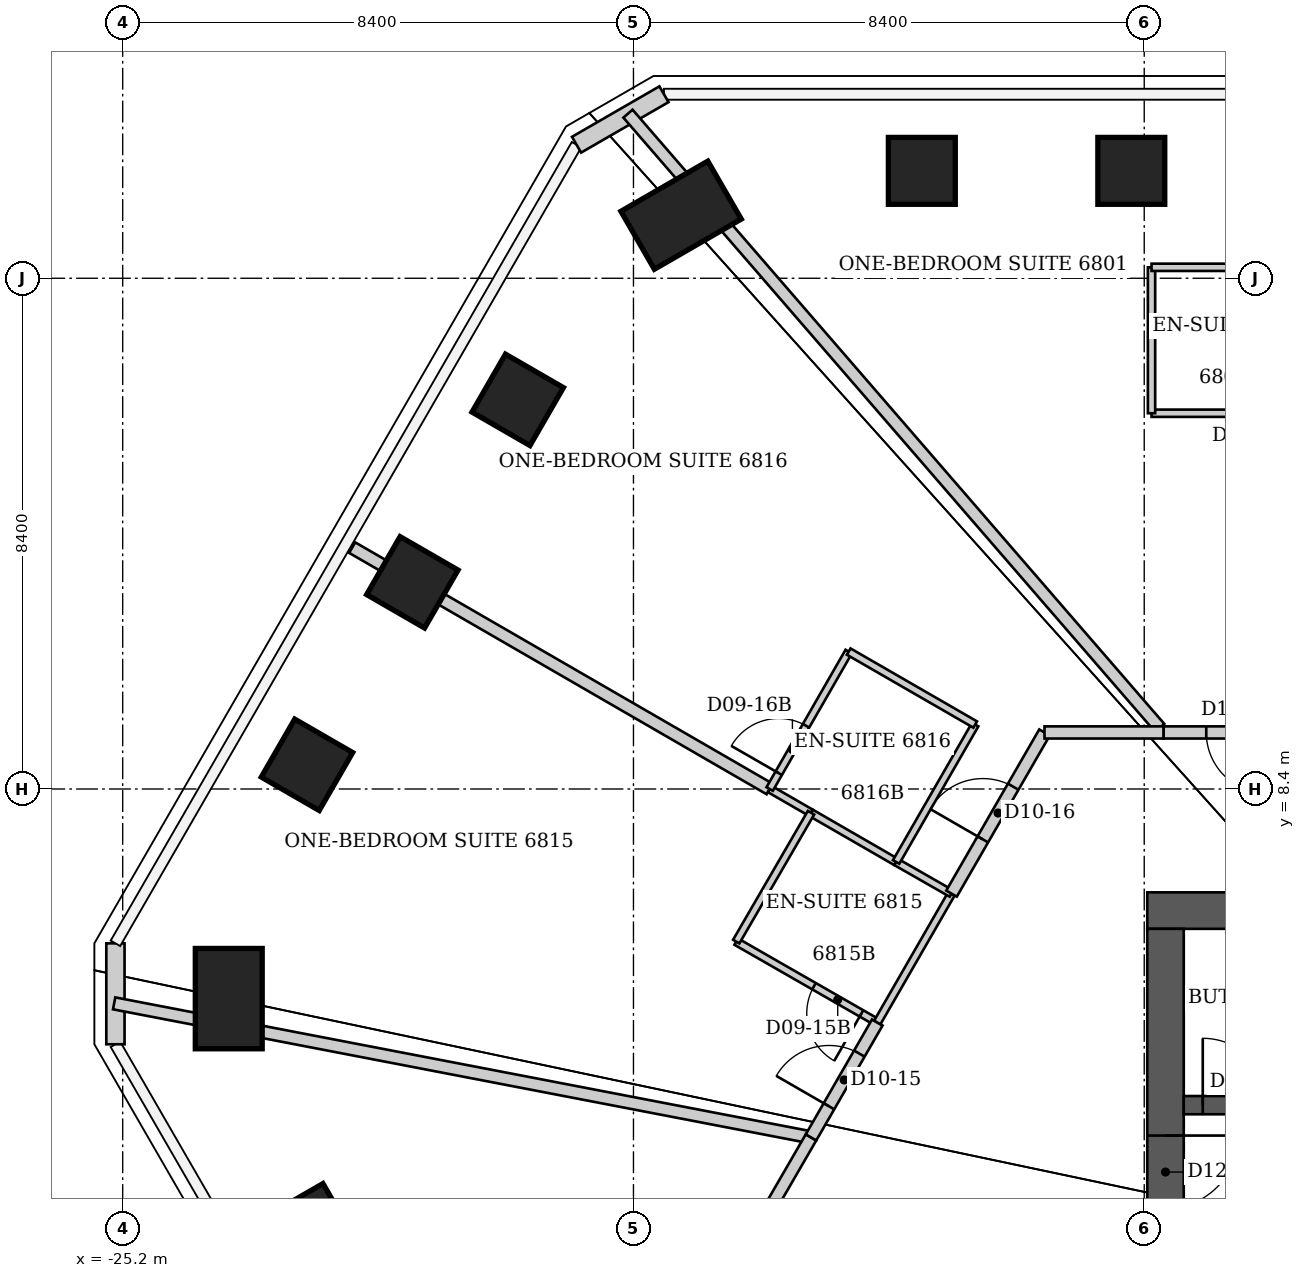
"""IFC4 building model, lengths in metres.
Left out: names, types, materials, properties, quantities, classifications, styles, units other than length and angle.
Written with IfcOpenShell. Run it as: python <this file> out.ifc"""

import sys

from ifc_helpers import new_model, si_unit, direction, frame, frame_2d, origin, origin_2d, place, context, subcontext, project, spatial, rectangle, extrude, element, fill, save


model = new_model("IFC4")
c1 = context("Model", 3, precision=1e-05, world=origin(), true_north=direction((0.0, 1.0)))
c2 = subcontext(c1, "Body", "Model", "MODEL_VIEW")
j1 = project(units=[si_unit("LENGTHUNIT", "METRE"), si_unit("PLANEANGLEUNIT", "RADIAN")], contexts=[c1])
p1 = place(None, origin())
s1 = spatial("IfcSite", under=j1, at=p1, CompositionType="ELEMENT")
p2 = place(p1, origin())
s2 = spatial("IfcBuilding", under=s1, at=p2, CompositionType="ELEMENT")
p3 = place(p2, frame((0.0, 0.0, 272.2)))
s3 = spatial("IfcBuildingStorey", under=s2, at=p3, CompositionType="ELEMENT", Elevation=272.2)
for number, where, z_axis, x_axis in (
    (1, (-12.058, 18.566, 0.0), (0.0, 0.0, 1.0), (0.0, 1.0, 0.0)),
    (2, (-8.613, 18.566, 0.0), (0.0, 0.0, 1.0), (0.0, 1.0, 0.0)),
    (3, (-22.108, 1.159, 0.0), (0.0, 0.0, 1.0), (-0.866, -0.5, 0.0)),
):
    element("IfcColumn", number, at=place(p3, frame(where, z_axis=z_axis, x_axis=x_axis)), inside=s3, PredefinedType="COLUMN", context=c2, shape_type="SweptSolid", body=[
        extrude(rectangle(XDim=1.1, YDim=1.1, at=origin_2d()), origin(), (0.0, 0.0, 1.0), 3.8),
    ])
p4 = place(p3, frame((-23.456, 4.952, 0.0), z_axis=(0.0, 0.0, 1.0), x_axis=(-1.0, 0.0, 0.0)))
e4 = element("IfcColumn", 4, at=p4, inside=s3, PredefinedType="COLUMN", context=c2, shape_type="SweptSolid", body=[
    extrude(rectangle(XDim=1.1, YDim=1.65, at=origin_2d()), origin(), (0.0, 0.0, 1.0), 3.8),
])
for number, where, z_axis, x_axis in (
    (5, (-22.169, 8.798, 0.0), (0.0, 0.0, 1.0), (-0.866, 0.5, 0.0)),
    (6, (-20.437, 11.799, 0.0), (0.0, 0.0, 1.0), (-0.866, 0.5, 0.0)),
    (7, (-18.704, 14.8, 0.0), (0.0, 0.0, 1.0), (-0.866, 0.5, 0.0)),
):
    element("IfcColumn", number, at=place(p3, frame(where, z_axis=z_axis, x_axis=x_axis)), inside=s3, PredefinedType="COLUMN", context=c2, shape_type="SweptSolid", body=[
        extrude(rectangle(XDim=1.1, YDim=1.1, at=origin_2d()), origin(), (0.0, 0.0, 1.0), 3.8),
    ])
p5 = place(p3, frame((-16.017, 17.837, 0.0), z_axis=(0.0, 0.0, 1.0), x_axis=(-0.5, 0.866025403784, 0.0)))
e8 = element("IfcColumn", 8, at=p5, inside=s3, PredefinedType="COLUMN", context=c2, shape_type="SweptSolid", body=[
    extrude(rectangle(XDim=1.1, YDim=1.65, at=origin_2d()), origin(), (0.0, 0.0, 1.0), 3.8),
])
p6 = place(p3, frame((-8.35, 6.4, 0.0), z_axis=(0.0, 0.0, 1.0), x_axis=(1.0, 0.0, 0.0)))
e9 = element("IfcWall", 9, at=p6, inside=s3, PredefinedType="SHEAR", context=c2, shape_type="SweptSolid", body=[
    extrude(rectangle(XDim=16.7, YDim=0.6, at=frame_2d((8.35, 0.0))), origin(), (0.0, 0.0, 1.0), 3.8),
])
p7 = place(p6, frame((6.488, 0.0, 0.0)))
e10 = element("IfcOpeningElement", 10, at=p7, cuts=e9, PredefinedType="OPENING", context=c2, shape_type="SweptSolid", body=[
    extrude(rectangle(XDim=1.1, YDim=2.1, at=frame_2d((0.55, 1.05))), frame((0.0, 0.3, 0.0), z_axis=(0.0, -1.0, 0.0), x_axis=(1.0, 0.0, 0.0)), (0.0, 0.0, 1.0), 0.6),
])
p8 = place(p6, frame((9.113, 0.0, 0.0)))
e11 = element("IfcOpeningElement", 11, at=p8, cuts=e9, PredefinedType="OPENING", context=c2, shape_type="SweptSolid", body=[
    extrude(rectangle(XDim=1.1, YDim=2.1, at=frame_2d((0.55, 1.05))), frame((0.0, 0.3, 0.0), z_axis=(0.0, -1.0, 0.0), x_axis=(1.0, 0.0, 0.0)), (0.0, 0.0, 1.0), 0.6),
])
p9 = place(p6, frame((11.738, 0.0, 0.0)))
e12 = element("IfcOpeningElement", 12, at=p9, cuts=e9, PredefinedType="OPENING", context=c2, shape_type="SweptSolid", body=[
    extrude(rectangle(XDim=1.1, YDim=2.1, at=frame_2d((0.55, 1.05))), frame((0.0, 0.3, 0.0), z_axis=(0.0, -1.0, 0.0), x_axis=(1.0, 0.0, 0.0)), (0.0, 0.0, 1.0), 0.6),
])
p10 = place(p6, frame((14.363, 0.0, 0.0)))
e13 = element("IfcOpeningElement", 13, at=p10, cuts=e9, PredefinedType="OPENING", context=c2, shape_type="SweptSolid", body=[
    extrude(rectangle(XDim=1.1, YDim=2.1, at=frame_2d((0.55, 1.05))), frame((0.0, 0.3, 0.0), z_axis=(0.0, -1.0, 0.0), x_axis=(1.0, 0.0, 0.0)), (0.0, 0.0, 1.0), 0.6),
])
p11 = place(p3, frame((-8.05, -6.1, 0.0), z_axis=(0.0, 0.0, 1.0), x_axis=(0.0, 1.0, 0.0)))
e14 = element("IfcWall", 14, at=p11, inside=s3, PredefinedType="SHEAR", context=c2, shape_type="SweptSolid", body=[
    extrude(rectangle(XDim=12.2, YDim=0.6, at=frame_2d((6.1, 0.0))), origin(), (0.0, 0.0, 1.0), 3.8),
])
p12 = place(p11, frame((7.6, 0.0, 0.0)))
e15 = element("IfcOpeningElement", 15, at=p12, cuts=e14, PredefinedType="OPENING", context=c2, shape_type="SweptSolid", body=[
    extrude(rectangle(XDim=1.2, YDim=2.2, at=frame_2d((0.6, 1.1))), frame((0.0, 0.3, 0.0), z_axis=(0.0, -1.0, 0.0), x_axis=(1.0, 0.0, 0.0)), (0.0, 0.0, 1.0), 0.6),
])
p13 = place(p3, frame((-7.75, 3.2, 0.0), z_axis=(0.0, 0.0, 1.0), x_axis=(1.0, 0.0, 0.0)))
e16 = element("IfcWall", 16, at=p13, inside=s3, PredefinedType="SHEAR", context=c2, shape_type="SweptSolid", body=[
    extrude(rectangle(XDim=15.5, YDim=0.3, at=frame_2d((7.75, 0.0))), origin(), (0.0, 0.0, 1.0), 3.8),
])
p14 = place(p13, frame((0.312, 0.0, 0.0)))
e17 = element("IfcOpeningElement", 17, at=p14, cuts=e16, PredefinedType="OPENING", context=c2, shape_type="SweptSolid", body=[
    extrude(rectangle(XDim=1.1, YDim=2.2, at=frame_2d((0.55, 1.1))), frame((0.0, 0.15, 0.0), z_axis=(0.0, -1.0, 0.0), x_axis=(1.0, 0.0, 0.0)), (0.0, 0.0, 1.0), 0.3),
])
p15 = place(p13, frame((2.887, 0.0, 0.0)))
e18 = element("IfcOpeningElement", 18, at=p15, cuts=e16, PredefinedType="OPENING", context=c2, shape_type="SweptSolid", body=[
    extrude(rectangle(XDim=1.1, YDim=2.2, at=frame_2d((0.55, 1.1))), frame((0.0, 0.15, 0.0), z_axis=(0.0, -1.0, 0.0), x_axis=(1.0, 0.0, 0.0)), (0.0, 0.0, 1.0), 0.3),
])
p16 = place(p3, frame((-25.319, 4.202, 0.0), z_axis=(0.0, 0.0, 1.0), x_axis=(0.0, 1.0, 0.0)))
e19 = element("IfcWall", 19, at=p16, inside=s3, PredefinedType="SOLIDWALL", context=c2, shape_type="SweptSolid", body=[
    extrude(rectangle(XDim=1.66, YDim=0.3, at=frame_2d((0.83, 0.0))), origin(), (0.0, 0.0, 1.0), 3.64),
])
p17 = place(p3, frame((-17.736, 18.996, 0.0), z_axis=(0.0, 0.0, 1.0), x_axis=(0.866026405774, 0.499998264499, 0.0)))
e20 = element("IfcWall", 20, at=p17, inside=s3, PredefinedType="SOLIDWALL", context=c2, shape_type="SweptSolid", body=[
    extrude(rectangle(XDim=1.66, YDim=0.3, at=frame_2d((0.83, 0.0))), origin(), (0.0, 0.0, 1.0), 3.64),
])
p18 = place(p3, frame((-25.341, 4.874, 0.0), z_axis=(0.0, 0.0, 1.0), x_axis=(0.98200120174, -0.188874666859, 0.0)))
e21 = element("IfcWall", 21, at=p18, inside=s3, PredefinedType="PARTITIONING", context=c2, shape_type="SweptSolid", body=[
    extrude(rectangle(XDim=11.621, YDim=0.2, at=frame_2d((5.81, 0.0))), origin(), (0.0, 0.0, 1.0), 3.64),
])
p19 = place(p3, frame((-21.426, 12.37, 0.0), z_axis=(0.0, 0.0, 1.0), x_axis=(0.865702942609, -0.500558103679, 0.0)))
e22 = element("IfcWall", 22, at=p19, inside=s3, PredefinedType="PARTITIONING", context=c2, shape_type="SweptSolid", body=[
    extrude(rectangle(XDim=7.931, YDim=0.2, at=frame_2d((3.966, 0.0))), origin(), (0.0, 0.0, 1.0), 2.878),
])
p20 = place(p3, frame((-15.11, 5.89, 0.0), z_axis=(0.0, 0.0, 1.0), x_axis=(0.867585049529, -0.497288831399, 0.0)))
e23 = element("IfcWall", 23, at=p20, inside=s3, PredefinedType="PARTITIONING", context=c2, shape_type="SweptSolid", body=[
    extrude(rectangle(XDim=2.674, YDim=0.12, at=frame_2d((1.337, 0.0))), origin(), (0.0, 0.0, 1.0), 3.64),
])
p21 = place(p20, frame((1.474, 0.0, 0.0)))
e24 = element("IfcOpeningElement", 24, at=p21, cuts=e23, PredefinedType="OPENING", context=c2, shape_type="SweptSolid", body=[
    extrude(rectangle(XDim=0.9, YDim=2.03, at=frame_2d((0.45, 1.015))), frame((0.0, 0.06, 0.0), z_axis=(0.0, -1.0, 0.0), x_axis=(1.0, 0.0, 0.0)), (0.0, 0.0, 1.0), 0.12),
])
p22 = place(p3, frame((-14.56, 8.4, 0.0), z_axis=(0.0, 0.0, 1.0), x_axis=(0.866242622795, -0.499623576758, 0.0)))
e25 = element("IfcWall", 25, at=p22, inside=s3, PredefinedType="PARTITIONING", context=c2, shape_type="SweptSolid", body=[
    extrude(rectangle(XDim=0.784, YDim=0.12, at=frame_2d((0.392, 0.0))), origin(), (0.0, 0.0, 1.0), 2.878),
])
p23 = place(p3, frame((-14.54, 1.53, 0.0), z_axis=(0.0, 0.0, 1.0), x_axis=(0.501160466528, 0.865354370642, 0.0)))
e26 = element("IfcWall", 26, at=p23, inside=s3, PredefinedType="PARTITIONING", context=c2, shape_type="SweptSolid", body=[
    extrude(rectangle(XDim=1.317, YDim=0.2, at=frame_2d((0.659, 0.0))), origin(), (0.0, 0.0, 1.0), 3.64),
])
p24 = place(p3, frame((-13.881, 8.008, 0.0), z_axis=(0.0, 0.0, 1.0), x_axis=(0.866183073342, -0.499726808823, 0.0)))
e27 = element("IfcWall", 27, at=p24, inside=s3, PredefinedType="PARTITIONING", context=c2, shape_type="SweptSolid", body=[
    extrude(rectangle(XDim=1.618, YDim=0.12, at=frame_2d((0.809, 0.0))), origin(), (0.0, 0.0, 1.0), 2.878),
])
p25 = place(p3, frame((-13.88, 2.67, 0.0), z_axis=(0.0, 0.0, 1.0), x_axis=(0.499509324401, 0.866308510195, 0.0)))
e28 = element("IfcWall", 28, at=p25, inside=s3, PredefinedType="PARTITIONING", context=c2, shape_type="SweptSolid", body=[
    extrude(rectangle(XDim=2.182, YDim=0.2, at=frame_2d((1.091, 0.0))), origin(), (0.0, 0.0, 1.0), 3.64),
])
p26 = place(p25, frame((0.591, 0.0, 0.0)))
e29 = element("IfcOpeningElement", 29, at=p26, cuts=e28, PredefinedType="OPENING", context=c2, shape_type="SweptSolid", body=[
    extrude(rectangle(XDim=1.0, YDim=2.13, at=frame_2d((0.5, 1.065))), frame((0.0, 0.1, 0.0), z_axis=(0.0, -1.0, 0.0), x_axis=(1.0, 0.0, 0.0)), (0.0, 0.0, 1.0), 0.2),
])
p27 = place(p3, frame((-13.88, 8.01, 0.0), z_axis=(0.0, 0.0, 1.0), x_axis=(-0.501888006485, -0.864932615264, 0.0)))
e30 = element("IfcWall", 30, at=p27, inside=s3, PredefinedType="PARTITIONING", context=c2, shape_type="SweptSolid", body=[
    extrude(rectangle(XDim=2.451, YDim=0.12, at=frame_2d((1.226, 0.0))), origin(), (0.0, 0.0, 1.0), 3.64),
])
p28 = place(p3, frame((-13.26, 10.66, 0.0), z_axis=(0.0, 0.0, 1.0), x_axis=(-0.498627694264, -0.866816256489, 0.0)))
e31 = element("IfcWall", 31, at=p28, inside=s3, PredefinedType="PARTITIONING", context=c2, shape_type="SweptSolid", body=[
    extrude(rectangle(XDim=2.607, YDim=0.12, at=frame_2d((1.304, 0.0))), origin(), (0.0, 0.0, 1.0), 3.64),
])
p29 = place(p28, frame((1.407, 0.0, 0.0)))
e32 = element("IfcOpeningElement", 32, at=p29, cuts=e31, PredefinedType="OPENING", context=c2, shape_type="SweptSolid", body=[
    extrude(rectangle(XDim=0.9, YDim=2.03, at=frame_2d((0.45, 1.015))), frame((0.0, 0.06, 0.0), z_axis=(0.0, -1.0, 0.0), x_axis=(1.0, 0.0, 0.0)), (0.0, 0.0, 1.0), 0.12),
])
p30 = place(p3, frame((-12.79, 4.56, 0.0), z_axis=(0.0, 0.0, 1.0), x_axis=(0.499252904436, 0.866456310158, 0.0)))
e33 = element("IfcWall", 33, at=p30, inside=s3, PredefinedType="PARTITIONING", context=c2, shape_type="SweptSolid", body=[
    extrude(rectangle(XDim=2.446, YDim=0.12, at=frame_2d((1.223, 0.0))), origin(), (0.0, 0.0, 1.0), 3.64),
])
p31 = place(p3, frame((-12.48, 7.2, 0.0), z_axis=(0.0, 0.0, 1.0), x_axis=(0.868214469581, -0.496189111942, 0.0)))
e34 = element("IfcWall", 34, at=p31, inside=s3, PredefinedType="PARTITIONING", context=c2, shape_type="SweptSolid", body=[
    extrude(rectangle(XDim=1.048, YDim=0.12, at=frame_2d((0.524, 0.0))), origin(), (0.0, 0.0, 1.0), 2.878),
])
p32 = place(p3, frame((-12.48, 7.2, 0.0), z_axis=(0.0, 0.0, 1.0), x_axis=(0.498627694264, 0.866816256489, 0.0)))
e35 = element("IfcWall", 35, at=p32, inside=s3, PredefinedType="PARTITIONING", context=c2, shape_type="SweptSolid", body=[
    extrude(rectangle(XDim=2.607, YDim=0.12, at=frame_2d((1.304, 0.0))), origin(), (0.0, 0.0, 1.0), 3.64),
])
p33 = place(p3, frame((-11.569, 6.679, 0.0), z_axis=(0.0, 0.0, 1.0), x_axis=(0.499623447589, 0.866242697297, 0.0)))
e36 = element("IfcWall", 36, at=p33, inside=s3, PredefinedType="PARTITIONING", context=c2, shape_type="SweptSolid", body=[
    extrude(rectangle(XDim=3.06, YDim=0.2, at=frame_2d((1.53, 0.0))), origin(), (0.0, 0.0, 1.0), 3.64),
])
p34 = place(p33, frame((1.03, 0.0, 0.0)))
e37 = element("IfcOpeningElement", 37, at=p34, cuts=e36, PredefinedType="OPENING", context=c2, shape_type="SweptSolid", body=[
    extrude(rectangle(XDim=1.0, YDim=2.13, at=frame_2d((0.5, 1.065))), frame((0.0, 0.1, 0.0), z_axis=(0.0, -1.0, 0.0), x_axis=(1.0, 0.0, 0.0)), (0.0, 0.0, 1.0), 0.2),
])
p35 = place(p3, frame((-11.18, 9.46, 0.0), z_axis=(0.0, 0.0, 1.0), x_axis=(-0.866202511239, 0.499693115345, 0.0)))
e38 = element("IfcWall", 38, at=p35, inside=s3, PredefinedType="PARTITIONING", context=c2, shape_type="SweptSolid", body=[
    extrude(rectangle(XDim=2.401, YDim=0.12, at=frame_2d((1.201, 0.0))), origin(), (0.0, 0.0, 1.0), 3.64),
])
p36 = place(p3, frame((-8.28, 14.58, 0.0), z_axis=(0.0, 0.0, 1.0), x_axis=(1.0, 0.0, 0.0)))
e39 = element("IfcWall", 39, at=p36, inside=s3, PredefinedType="PARTITIONING", context=c2, shape_type="SweptSolid", body=[
    extrude(rectangle(XDim=2.6, YDim=0.12, at=frame_2d((1.3, 0.0))), origin(), (0.0, 0.0, 1.0), 3.64),
])
p37 = place(p36, frame((1.25, 0.0, 0.0)))
e40 = element("IfcOpeningElement", 40, at=p37, cuts=e39, PredefinedType="OPENING", context=c2, shape_type="SweptSolid", body=[
    extrude(rectangle(XDim=0.9, YDim=2.03, at=frame_2d((0.45, 1.015))), frame((0.0, 0.06, 0.0), z_axis=(0.0, -1.0, 0.0), x_axis=(1.0, 0.0, 0.0)), (0.0, 0.0, 1.0), 0.12),
])
p38 = place(p3, frame((-8.28, 16.98, 0.0), z_axis=(0.0, 0.0, 1.0), x_axis=(0.0, -1.0, 0.0)))
e41 = element("IfcWall", 41, at=p38, inside=s3, PredefinedType="PARTITIONING", context=c2, shape_type="SweptSolid", body=[
    extrude(rectangle(XDim=2.4, YDim=0.12, at=frame_2d((1.2, 0.0))), origin(), (0.0, 0.0, 1.0), 3.64),
])
p39 = place(p3, frame((-8.146, 9.406, 0.0), z_axis=(0.0, 0.0, 1.0), x_axis=(-0.654501911032, 0.756060347099, 0.0)))
e42 = element("IfcWall", 42, at=p39, inside=s3, PredefinedType="PARTITIONING", context=c2, shape_type="SweptSolid", body=[
    extrude(rectangle(XDim=13.361, YDim=0.2, at=frame_2d((6.681, 0.0))), origin(), (0.0, 0.0, 1.0), 3.64),
])
p40 = place(p3, frame((-8.08, 9.33, 0.0), z_axis=(0.0, 0.0, 1.0), x_axis=(-1.0, 0.0, 0.0)))
e43 = element("IfcWall", 43, at=p40, inside=s3, PredefinedType="PARTITIONING", context=c2, shape_type="SweptSolid", body=[
    extrude(rectangle(XDim=1.96, YDim=0.2, at=frame_2d((0.98, 0.0))), origin(), (0.0, 0.0, 1.0), 3.64),
])
p41 = place(p3, frame((-5.68, 9.33, 0.0), z_axis=(0.0, 0.0, 1.0), x_axis=(-1.0, 0.0, 0.0)))
e44 = element("IfcWall", 44, at=p41, inside=s3, PredefinedType="PARTITIONING", context=c2, shape_type="SweptSolid", body=[
    extrude(rectangle(XDim=2.4, YDim=0.2, at=frame_2d((1.2, 0.0))), origin(), (0.0, 0.0, 1.0), 3.64),
])
p42 = place(p41, frame((0.7, 0.0, 0.0)))
e45 = element("IfcOpeningElement", 45, at=p42, cuts=e44, PredefinedType="OPENING", context=c2, shape_type="SweptSolid", body=[
    extrude(rectangle(XDim=1.0, YDim=2.13, at=frame_2d((0.5, 1.065))), frame((0.0, 0.1, 0.0), z_axis=(0.0, -1.0, 0.0), x_axis=(1.0, 0.0, 0.0)), (0.0, 0.0, 1.0), 0.2),
])
p43 = place(p3, frame((-5.68, 16.98, 0.0), z_axis=(0.0, 0.0, 1.0), x_axis=(-1.0, 0.0, 0.0)))
e46 = element("IfcWall", 46, at=p43, inside=s3, PredefinedType="PARTITIONING", context=c2, shape_type="SweptSolid", body=[
    extrude(rectangle(XDim=2.6, YDim=0.12, at=frame_2d((1.3, 0.0))), origin(), (0.0, 0.0, 1.0), 3.64),
])
p44 = place(p42, origin())
e47 = element("IfcDoor", 47, at=p44, inside=s3, OperationType="SINGLE_SWING_LEFT", PredefinedType="DOOR", context=c2, shape_type="SweptSolid", body=[
    extrude(rectangle(XDim=1.0, YDim=2.13, at=frame_2d((0.5, 1.065))), frame((0.0, 0.025, 0.0), z_axis=(0.0, -1.0, 0.0), x_axis=(1.0, 0.0, 0.0)), (0.0, 0.0, 1.0), 0.05),
])
fill(e45, e47)
p45 = place(p26, origin())
e48 = element("IfcDoor", 48, at=p45, inside=s3, OperationType="SINGLE_SWING_LEFT", PredefinedType="DOOR", context=c2, shape_type="SweptSolid", body=[
    extrude(rectangle(XDim=1.0, YDim=2.13, at=frame_2d((0.5, 1.065))), frame((0.0, 0.025, 0.0), z_axis=(0.0, -1.0, 0.0), x_axis=(1.0, 0.0, 0.0)), (0.0, 0.0, 1.0), 0.05),
])
fill(e29, e48)
p46 = place(p21, origin())
e49 = element("IfcDoor", 49, at=p46, inside=s3, OperationType="SINGLE_SWING_RIGHT", PredefinedType="DOOR", context=c2, shape_type="SweptSolid", body=[
    extrude(rectangle(XDim=0.9, YDim=2.03, at=frame_2d((0.45, 1.015))), frame((0.0, 0.025, 0.0), z_axis=(0.0, -1.0, 0.0), x_axis=(1.0, 0.0, 0.0)), (0.0, 0.0, 1.0), 0.05),
])
fill(e24, e49)
p47 = place(p34, origin())
e50 = element("IfcDoor", 50, at=p47, inside=s3, OperationType="SINGLE_SWING_LEFT", PredefinedType="DOOR", context=c2, shape_type="SweptSolid", body=[
    extrude(rectangle(XDim=1.0, YDim=2.13, at=frame_2d((0.5, 1.065))), frame((0.0, 0.025, 0.0), z_axis=(0.0, -1.0, 0.0), x_axis=(1.0, 0.0, 0.0)), (0.0, 0.0, 1.0), 0.05),
])
fill(e37, e50)
p48 = place(p29, origin())
e51 = element("IfcDoor", 51, at=p48, inside=s3, OperationType="SINGLE_SWING_RIGHT", PredefinedType="DOOR", context=c2, shape_type="SweptSolid", body=[
    extrude(rectangle(XDim=0.9, YDim=2.03, at=frame_2d((0.45, 1.015))), frame((0.0, 0.025, 0.0), z_axis=(0.0, -1.0, 0.0), x_axis=(1.0, 0.0, 0.0)), (0.0, 0.0, 1.0), 0.05),
])
fill(e32, e51)
p49 = place(p12, origin())
e52 = element("IfcDoor", 52, at=p49, inside=s3, OperationType="SINGLE_SWING_RIGHT", PredefinedType="DOOR", context=c2, shape_type="SweptSolid", body=[
    extrude(rectangle(XDim=1.2, YDim=2.2, at=frame_2d((0.6, 1.1))), frame((0.0, 0.025, 0.0), z_axis=(0.0, -1.0, 0.0), x_axis=(1.0, 0.0, 0.0)), (0.0, 0.0, 1.0), 0.05),
])
fill(e15, e52)
p50 = place(p14, origin())
e53 = element("IfcDoor", 53, at=p50, inside=s3, OperationType="SINGLE_SWING_LEFT", PredefinedType="DOOR", context=c2, shape_type="SweptSolid", body=[
    extrude(rectangle(XDim=1.1, YDim=2.2, at=frame_2d((0.55, 1.1))), frame((0.0, 0.025, 0.0), z_axis=(0.0, -1.0, 0.0), x_axis=(1.0, 0.0, 0.0)), (0.0, 0.0, 1.0), 0.05),
])
fill(e17, e53)
save(model, sys.argv[1])
